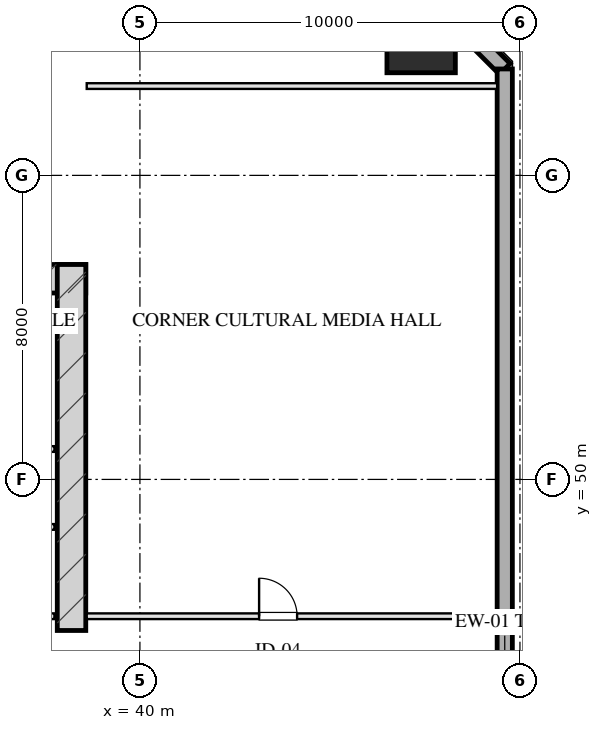
"""IFC4 building model, lengths in metres.
Left out: names, types, materials, properties, quantities, classifications, styles, units other than length and angle.
Written with IfcOpenShell. Run it as: python <this file> out.ifc"""

import sys

from ifc_helpers import new_model, si_unit, direction, frame, frame_2d, origin, origin_2d, place, context, subcontext, project, spatial, rectangle, hollow_rectangle, extrude, element, fill, save


model = new_model("IFC4")
c1 = context("Model", 3, precision=1e-05, world=origin(), true_north=direction((0.0, 1.0)))
c2 = subcontext(c1, "Body", "Model", "MODEL_VIEW")
j1 = project(units=[si_unit("LENGTHUNIT", "METRE"), si_unit("PLANEANGLEUNIT", "RADIAN")], contexts=[c1])
p1 = place(None, origin())
s1 = spatial("IfcSite", under=j1, at=p1, CompositionType="ELEMENT")
p2 = place(p1, origin())
s2 = spatial("IfcBuilding", under=s1, at=p2, CompositionType="ELEMENT")
p3 = place(p2, frame((0.0, 0.0, 81.65)))
s3 = spatial("IfcBuildingStorey", under=s2, at=p3, CompositionType="ELEMENT", Elevation=81.65)
p4 = place(p3, frame((21.425, 55.28, 0.0), z_axis=(0.0, 0.0, 1.0), x_axis=(1.0, 0.0, 0.0)))
e1 = element("IfcWall", 1, at=p4, inside=s3, PredefinedType="SHEAR", context=c2, shape_type="SweptSolid", body=[
    extrude(rectangle(XDim=17.15, YDim=0.75, at=frame_2d((8.575, 0.0))), origin(), (0.0, 0.0, 1.0), 3.45),
])
p5 = place(p3, frame((38.2, 46.025, 0.0), z_axis=(0.0, 0.0, 1.0), x_axis=(0.0, 1.0, 0.0)))
e2 = element("IfcWall", 2, at=p5, inside=s3, PredefinedType="SHEAR", context=c2, shape_type="SweptSolid", body=[
    extrude(rectangle(XDim=9.63, YDim=0.75, at=frame_2d((4.815, 0.0))), origin(), (0.0, 0.0, 1.0), 3.45),
])
p6 = place(p3, frame((47.4, 61.6, 0.0), z_axis=(0.0, 0.0, 1.0), x_axis=(1.0, 0.0, 0.0)))
e3 = element("IfcColumn", 3, at=p6, inside=s3, PredefinedType="COLUMN", context=c2, shape_type="SweptSolid", body=[
    extrude(hollow_rectangle(XDim=1.8, YDim=1.8, WallThickness=0.06, at=origin_2d()), origin(), (0.0, 0.0, 1.0), 3.451),
])
p7 = place(p3, frame((46.6, 63.8, 0.0), z_axis=(0.0, 0.0, 1.0), x_axis=(0.707106781187, -0.707106781187, 0.0)))
e4 = element("IfcWall", 4, at=p7, inside=s3, PredefinedType="SOLIDWALL", context=c2, shape_type="SweptSolid", body=[
    extrude(rectangle(XDim=4.243, YDim=0.4, at=frame_2d((2.121, 0.0))), origin(), (0.0, 0.0, 1.0), 2.61),
])
p8 = place(p3, frame((49.6, 60.8, 0.0), z_axis=(0.0, 0.0, 1.0), x_axis=(0.0, -1.0, 0.0)))
e5 = element("IfcWall", 5, at=p8, inside=s3, PredefinedType="SOLIDWALL", context=c2, shape_type="SweptSolid", body=[
    extrude(rectangle(XDim=53.6, YDim=0.4, at=frame_2d((26.8, 0.0))), origin(), (0.0, 0.0, 1.0), 2.61),
])
p9 = place(p8, frame((32.05, 0.0, 0.0)))
e6 = element("IfcOpeningElement", 6, at=p9, cuts=e5, PredefinedType="OPENING", context=c2, shape_type="SweptSolid", body=[
    extrude(rectangle(XDim=1.1, YDim=2.15, at=frame_2d((0.55, 1.075))), frame((0.0, 0.21, 0.0), z_axis=(0.0, -1.0, 0.0), x_axis=(1.0, 0.0, 0.0)), (0.0, 0.0, 1.0), 0.42),
])
p10 = place(p3, frame((33.95, 46.4, 0.0), z_axis=(0.0, 0.0, 1.0), x_axis=(1.0, 0.0, 0.0)))
e7 = element("IfcWall", 7, at=p10, inside=s3, PredefinedType="PARTITIONING", context=c2, shape_type="SweptSolid", body=[
    extrude(rectangle(XDim=3.8, YDim=0.15, at=frame_2d((1.9, 0.0))), origin(), (0.0, 0.0, 1.0), 3.175),
])
p11 = place(p10, frame((0.22, 0.0, 0.0)))
e8 = element("IfcOpeningElement", 8, at=p11, cuts=e7, PredefinedType="OPENING", context=c2, shape_type="SweptSolid", body=[
    extrude(rectangle(XDim=0.95, YDim=2.05, at=frame_2d((0.475, 1.025))), frame((0.0, 0.085, 0.0), z_axis=(0.0, -1.0, 0.0), x_axis=(1.0, 0.0, 0.0)), (0.0, 0.0, 1.0), 0.17),
])
p12 = place(p10, frame((1.95, 0.0, 0.0)))
e9 = element("IfcOpeningElement", 9, at=p12, cuts=e7, PredefinedType="OPENING", context=c2, shape_type="SweptSolid", body=[
    extrude(rectangle(XDim=0.9, YDim=2.05, at=frame_2d((0.45, 1.025))), frame((0.0, 0.085, 0.0), z_axis=(0.0, -1.0, 0.0), x_axis=(1.0, 0.0, 0.0)), (0.0, 0.0, 1.0), 0.17),
])
for number, where, z_axis, x_axis in (
    (10, (35.45, 50.8, 0.0), (0.0, 0.0, 1.0), (1.0, 0.0, 0.0)),
    (11, (35.45, 48.75, 0.0), (0.0, 0.0, 1.0), (1.0, 0.0, 0.0)),
):
    element("IfcWall", number, at=place(p3, frame(where, z_axis=z_axis, x_axis=x_axis)), inside=s3, PredefinedType="PARTITIONING", context=c2, shape_type="SweptSolid", body=[
        extrude(rectangle(XDim=2.3, YDim=0.15, at=frame_2d((1.15, 0.0))), origin(), (0.0, 0.0, 1.0), 3.175),
    ])
p13 = place(p3, frame((38.6, 60.35, 0.0), z_axis=(0.0, 0.0, 1.0), x_axis=(1.0, 0.0, 0.0)))
e12 = element("IfcWall", 12, at=p13, inside=s3, PredefinedType="PARTITIONING", context=c2, shape_type="SweptSolid", body=[
    extrude(rectangle(XDim=10.8, YDim=0.15, at=frame_2d((5.4, 0.0))), origin(), (0.0, 0.0, 1.0), 3.175),
])
p14 = place(p3, frame((38.6, 46.4, 0.0), z_axis=(0.0, 0.0, 1.0), x_axis=(1.0, 0.0, 0.0)))
e13 = element("IfcWall", 13, at=p14, inside=s3, PredefinedType="PARTITIONING", context=c2, shape_type="SweptSolid", body=[
    extrude(rectangle(XDim=10.8, YDim=0.15, at=frame_2d((5.4, 0.0))), origin(), (0.0, 0.0, 1.0), 3.175),
])
p15 = place(p14, frame((4.536, 0.0, 0.0)))
e14 = element("IfcOpeningElement", 14, at=p15, cuts=e13, PredefinedType="OPENING", context=c2, shape_type="SweptSolid", body=[
    extrude(rectangle(XDim=1.0, YDim=2.05, at=frame_2d((0.5, 1.025))), frame((0.0, 0.085, 0.0), z_axis=(0.0, -1.0, 0.0), x_axis=(1.0, 0.0, 0.0)), (0.0, 0.0, 1.0), 0.17),
])
p16 = place(p15, origin())
e15 = element("IfcDoor", 15, at=p16, inside=s3, OperationType="SINGLE_SWING_LEFT", PredefinedType="DOOR", context=c2, shape_type="SweptSolid", body=[
    extrude(rectangle(XDim=1.0, YDim=2.05, at=frame_2d((0.5, 1.025))), frame((0.0, 0.025, 0.0), z_axis=(0.0, -1.0, 0.0), x_axis=(1.0, 0.0, 0.0)), (0.0, 0.0, 1.0), 0.05),
])
fill(e14, e15)
save(model, sys.argv[1])
